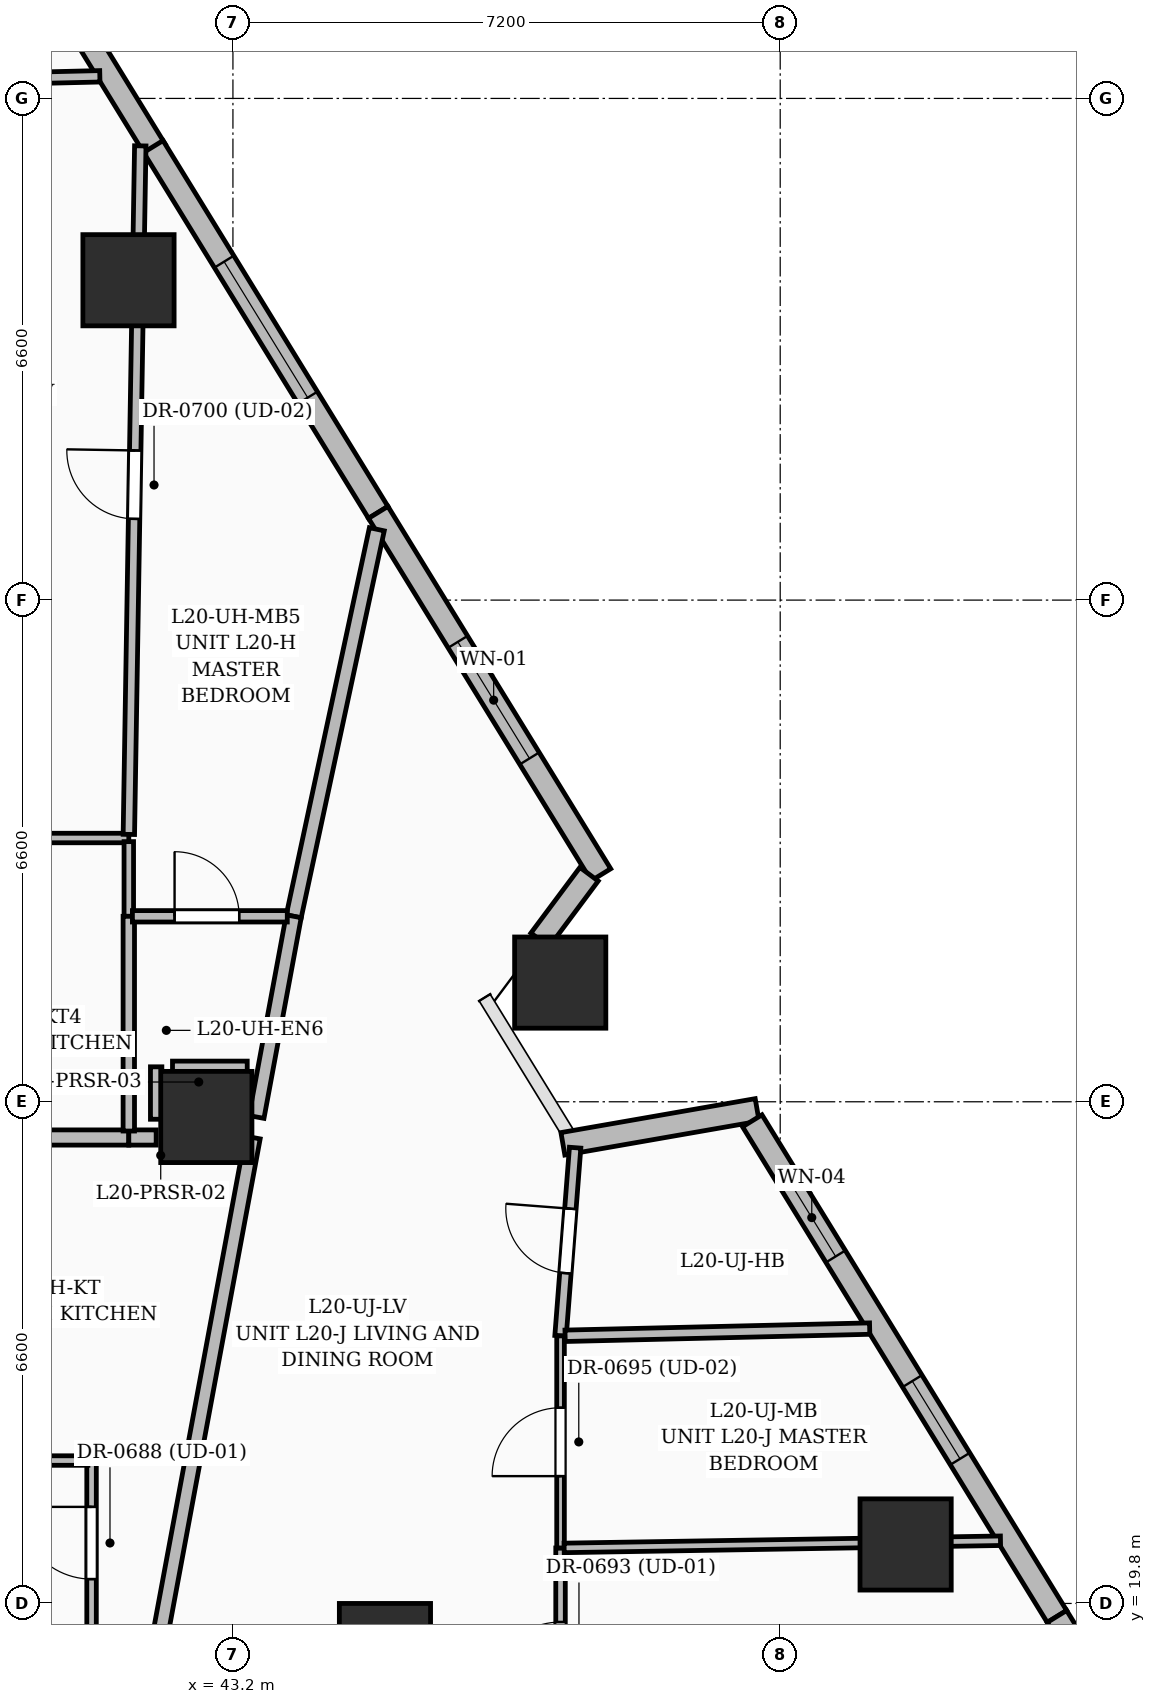
"""IFC4 building model, lengths in metres.
Left out: names, types, materials, properties, quantities, classifications, styles, units other than length and angle.
Written with IfcOpenShell. Run it as: python <this file> out.ifc"""

import sys

from ifc_helpers import new_model, si_unit, direction, frame, frame_2d, origin, origin_2d, place, context, subcontext, project, spatial, rectangle, extrude, element, fill, save


model = new_model("IFC4")
c1 = context("Model", 3, precision=1e-05, world=origin(), true_north=direction((0.0, 1.0)))
c2 = subcontext(c1, "Body", "Model", "MODEL_VIEW")
j1 = project(units=[si_unit("LENGTHUNIT", "METRE"), si_unit("PLANEANGLEUNIT", "RADIAN")], contexts=[c1])
p1 = place(None, origin())
s1 = spatial("IfcSite", under=j1, at=p1, CompositionType="ELEMENT")
p2 = place(p1, origin())
s2 = spatial("IfcBuilding", under=s1, at=p2, CompositionType="ELEMENT")
p3 = place(p2, frame((0.0, 0.0, 82.2)))
s3 = spatial("IfcBuildingStorey", under=s2, at=p3, CompositionType="ELEMENT", Elevation=82.2)
for number, where, z_axis, x_axis in (
    (1, (45.2, 19.2, 0.0), (0.0, 0.0, 1.0), (1.0, 0.0, 0.0)),
    (2, (42.85, 26.2, 0.0), (0.0, 0.0, 1.0), (1.0, 0.0, 0.0)),
    (3, (52.05, 20.576, 0.0), (0.0, 0.0, 1.0), (1.0, 0.0, 0.0)),
    (4, (47.506, 27.968, 0.0), (0.0, 0.0, 1.0), (1.0, 0.0, 0.0)),
    (5, (41.826, 37.208, 0.0), (0.0, 0.0, 1.0), (1.0, 0.0, 0.0)),
):
    element("IfcColumn", number, at=place(p3, frame(where, z_axis=z_axis, x_axis=x_axis)), inside=s3, PredefinedType="COLUMN", context=c2, shape_type="SweptSolid", body=[
        extrude(rectangle(XDim=1.2, YDim=1.2, at=origin_2d()), origin(), (0.0, 0.0, 1.0), 3.6),
    ])
p4 = place(p3, frame((39.54, 43.217, 0.0), z_axis=(0.0, 0.0, 1.0), x_axis=(0.52373802156, -0.851879383935, 0.0)))
e6 = element("IfcWall", 6, at=p4, inside=s3, PredefinedType="SOLIDWALL", context=c2, shape_type="SweptSolid", body=[
    extrude(rectangle(XDim=5.042, YDim=0.3, at=frame_2d((2.521, 0.0))), origin(), (0.0, 0.0, 1.0), 3.35),
])
p5 = place(p4, frame((1.295, 0.0, 0.55)))
e7 = element("IfcOpeningElement", 7, at=p5, cuts=e6, PredefinedType="OPENING", context=c2, shape_type="SweptSolid", body=[
    extrude(rectangle(XDim=2.1, YDim=2.4, at=frame_2d((1.05, 1.2))), frame((0.0, 0.16, 0.0), z_axis=(0.0, -1.0, 0.0), x_axis=(1.0, 0.0, 0.0)), (0.0, 0.0, 1.0), 0.32),
])
p6 = place(p3, frame((42.153, 38.967, 0.0), z_axis=(0.0, 0.0, 1.0), x_axis=(0.523687465278, -0.851910464022, 0.0)))
e8 = element("IfcWall", 8, at=p6, inside=s3, PredefinedType="SOLIDWALL", context=c2, shape_type="SweptSolid", body=[
    extrude(rectangle(XDim=5.649, YDim=0.3, at=frame_2d((2.825, 0.0))), origin(), (0.0, 0.0, 1.0), 3.35),
])
p7 = place(p6, frame((1.778, 0.0, 0.55)))
e9 = element("IfcOpeningElement", 9, at=p7, cuts=e8, PredefinedType="OPENING", context=c2, shape_type="SweptSolid", body=[
    extrude(rectangle(XDim=2.1, YDim=2.4, at=frame_2d((1.05, 1.2))), frame((0.0, 0.16, 0.0), z_axis=(0.0, -1.0, 0.0), x_axis=(1.0, 0.0, 0.0)), (0.0, 0.0, 1.0), 0.32),
])
p8 = place(p3, frame((45.111, 34.154, 0.0), z_axis=(0.0, 0.0, 1.0), x_axis=(0.523710369238, -0.851896384047, 0.0)))
e10 = element("IfcWall", 10, at=p8, inside=s3, PredefinedType="SOLIDWALL", context=c2, shape_type="SweptSolid", body=[
    extrude(rectangle(XDim=5.596, YDim=0.3, at=frame_2d((2.798, 0.0))), origin(), (0.0, 0.0, 1.0), 3.35),
])
p9 = place(p8, frame((2.0, 0.0, 0.6)))
e11 = element("IfcOpeningElement", 11, at=p9, cuts=e10, PredefinedType="OPENING", context=c2, shape_type="SweptSolid", body=[
    extrude(rectangle(XDim=1.8, YDim=2.1, at=frame_2d((0.9, 1.05))), frame((0.0, 0.16, 0.0), z_axis=(0.0, -1.0, 0.0), x_axis=(1.0, 0.0, 0.0)), (0.0, 0.0, 1.0), 0.32),
])
p10 = place(p3, frame((47.885, 29.394, 0.0), z_axis=(0.0, 0.0, 1.0), x_axis=(-0.598186461049, -0.801356947819, 0.0)))
e12 = element("IfcWall", 12, at=p10, inside=s3, PredefinedType="SOLIDWALL", context=c2, shape_type="SweptSolid", body=[
    extrude(rectangle(XDim=1.078, YDim=0.3, at=frame_2d((0.539, 0.0))), origin(), (0.0, 0.0, 1.0), 2.375),
])
p11 = place(p3, frame((47.541, 25.847, 0.0), z_axis=(0.0, 0.0, 1.0), x_axis=(0.985095505459, 0.172008270511, 0.0)))
e13 = element("IfcWall", 13, at=p11, inside=s3, PredefinedType="SOLIDWALL", context=c2, shape_type="SweptSolid", body=[
    extrude(rectangle(XDim=2.594, YDim=0.3, at=frame_2d((1.297, 0.0))), origin(), (0.0, 0.0, 1.0), 2.375),
])
p12 = place(p3, frame((50.032, 26.15, 0.0), z_axis=(0.0, 0.0, 1.0), x_axis=(0.523673810553, -0.851918857721, 0.0)))
e14 = element("IfcWall", 14, at=p12, inside=s3, PredefinedType="SOLIDWALL", context=c2, shape_type="SweptSolid", body=[
    extrude(rectangle(XDim=7.654, YDim=0.3, at=frame_2d((3.827, 0.0))), origin(), (0.0, 0.0, 1.0), 3.35),
])
p13 = place(p12, frame((0.895, 0.0, 0.8)))
e15 = element("IfcOpeningElement", 15, at=p13, cuts=e14, PredefinedType="OPENING", context=c2, shape_type="SweptSolid", body=[
    extrude(rectangle(XDim=1.2, YDim=1.8, at=frame_2d((0.6, 0.9))), frame((0.0, 0.16, 0.0), z_axis=(0.0, -1.0, 0.0), x_axis=(1.0, 0.0, 0.0)), (0.0, 0.0, 1.0), 0.32),
])
p14 = place(p12, frame((4.02, 0.0, 0.8)))
e16 = element("IfcOpeningElement", 16, at=p14, cuts=e14, PredefinedType="OPENING", context=c2, shape_type="SweptSolid", body=[
    extrude(rectangle(XDim=1.2, YDim=1.8, at=frame_2d((0.6, 0.9))), frame((0.0, 0.16, 0.0), z_axis=(0.0, -1.0, 0.0), x_axis=(1.0, 0.0, 0.0)), (0.0, 0.0, 1.0), 0.32),
])
p15 = place(p3, frame((54.041, 19.629, 0.0), z_axis=(0.0, 0.0, 1.0), x_axis=(0.523661280051, -0.851926560083, 0.0)))
e17 = element("IfcWall", 17, at=p15, inside=s3, PredefinedType="SOLIDWALL", context=c2, shape_type="SweptSolid", body=[
    extrude(rectangle(XDim=7.934, YDim=0.3, at=frame_2d((3.967, 0.0))), origin(), (0.0, 0.0, 1.0), 3.35),
])
p16 = place(p15, frame((3.45, 0.0, 0.6)))
e18 = element("IfcOpeningElement", 18, at=p16, cuts=e17, PredefinedType="OPENING", context=c2, shape_type="SweptSolid", body=[
    extrude(rectangle(XDim=2.4, YDim=2.1, at=frame_2d((1.2, 1.05))), frame((0.0, 0.16, 0.0), z_axis=(0.0, -1.0, 0.0), x_axis=(1.0, 0.0, 0.0)), (0.0, 0.0, 1.0), 0.32),
])
p17 = place(p3, frame((41.34, 17.835, 0.0), z_axis=(0.0, 0.0, 1.0), x_axis=(0.0, 1.0, 0.0)))
e19 = element("IfcWall", 19, at=p17, inside=s3, PredefinedType="PARTITIONING", context=c2, shape_type="SweptSolid", body=[
    extrude(rectangle(XDim=3.845, YDim=0.125, at=frame_2d((1.922, 0.0))), origin(), (0.0, 0.0, 1.0), 3.35),
])
p18 = place(p17, frame((2.285, 0.0, 0.0)))
e20 = element("IfcOpeningElement", 20, at=p18, cuts=e19, PredefinedType="OPENING", context=c2, shape_type="SweptSolid", body=[
    extrude(rectangle(XDim=0.95, YDim=2.2, at=frame_2d((0.475, 1.1))), frame((0.0, 0.072, 0.0), z_axis=(0.0, -1.0, 0.0), x_axis=(1.0, 0.0, 0.0)), (0.0, 0.0, 1.0), 0.145),
])
p19 = place(p3, frame((41.292, 21.68, 0.0), z_axis=(0.0, 0.0, 1.0), x_axis=(-1.0, 0.0, 0.0)))
e21 = element("IfcWall", 21, at=p19, inside=s3, PredefinedType="PARTITIONING", context=c2, shape_type="SweptSolid", body=[
    extrude(rectangle(XDim=2.742, YDim=0.125, at=frame_2d((1.371, 0.0))), origin(), (0.0, 0.0, 1.0), 3.35),
])
p20 = place(p3, frame((41.956, 17.833, 0.0), z_axis=(0.0, 0.0, 1.0), x_axis=(0.182682671213, 0.98317192883, 0.0)))
e22 = element("IfcWall", 22, at=p20, inside=s3, PredefinedType="PARTITIONING", context=c2, shape_type="SweptSolid", body=[
    extrude(rectangle(XDim=8.235, YDim=0.2, at=frame_2d((4.118, 0.0))), origin(), (0.0, 0.0, 1.0), 2.309),
])
p21 = place(p3, frame((41.83, 25.93, 0.0), z_axis=(0.0, 0.0, 1.0), x_axis=(-1.0, 0.0, 0.0)))
e23 = element("IfcWall", 23, at=p21, inside=s3, PredefinedType="PARTITIONING", context=c2, shape_type="SweptSolid", body=[
    extrude(rectangle(XDim=3.233, YDim=0.2, at=frame_2d((1.616, 0.0))), origin(), (0.0, 0.0, 1.0), 2.37),
])
p22 = place(p3, frame((42.19, 25.93, 0.0), z_axis=(0.0, 0.0, 1.0), x_axis=(-1.0, 0.0, 0.0)))
e24 = element("IfcWall", 24, at=p22, inside=s3, PredefinedType="PARTITIONING", context=c2, shape_type="SweptSolid", body=[
    extrude(rectangle(XDim=0.36, YDim=0.2, at=frame_2d((0.18, 0.0))), origin(), (0.0, 0.0, 1.0), 2.37),
])
p23 = place(p3, frame((47.51, 23.32, 0.0), z_axis=(0.0, 0.0, 1.0), x_axis=(0.077275386284, 0.997009786649, 0.0)))
e25 = element("IfcWall", 25, at=p23, inside=s3, PredefinedType="PARTITIONING", context=c2, shape_type="SweptSolid", body=[
    extrude(rectangle(XDim=2.483, YDim=0.15, at=frame_2d((1.242, 0.0))), origin(), (0.0, 0.0, 1.0), 3.35),
])
p24 = place(p23, frame((0.828, 0.0, 0.0)))
e26 = element("IfcOpeningElement", 26, at=p24, cuts=e25, PredefinedType="OPENING", context=c2, shape_type="SweptSolid", body=[
    extrude(rectangle(XDim=0.85, YDim=2.1, at=frame_2d((0.425, 1.05))), frame((0.0, 0.085, 0.0), z_axis=(0.0, -1.0, 0.0), x_axis=(1.0, 0.0, 0.0)), (0.0, 0.0, 1.0), 0.17),
])
p25 = place(p3, frame((47.51, 17.835, 0.0), z_axis=(0.0, 0.0, 1.0), x_axis=(0.0, 1.0, 0.0)))
e27 = element("IfcWall", 27, at=p25, inside=s3, PredefinedType="PARTITIONING", context=c2, shape_type="SweptSolid", body=[
    extrude(rectangle(XDim=2.695, YDim=0.125, at=frame_2d((1.348, 0.0))), origin(), (0.0, 0.0, 1.0), 2.709),
])
p26 = place(p25, frame((0.771, 0.0, 0.0)))
e28 = element("IfcOpeningElement", 28, at=p26, cuts=e27, PredefinedType="OPENING", context=c2, shape_type="SweptSolid", body=[
    extrude(rectangle(XDim=0.95, YDim=2.2, at=frame_2d((0.475, 1.1))), frame((0.0, 0.072, 0.0), z_axis=(0.0, -1.0, 0.0), x_axis=(1.0, 0.0, 0.0)), (0.0, 0.0, 1.0), 0.145),
])
p27 = place(p3, frame((47.51, 20.53, 0.0), z_axis=(0.0, 0.0, 1.0), x_axis=(0.0, 1.0, 0.0)))
e29 = element("IfcWall", 29, at=p27, inside=s3, PredefinedType="PARTITIONING", context=c2, shape_type="SweptSolid", body=[
    extrude(rectangle(XDim=2.79, YDim=0.1, at=frame_2d((1.395, 0.0))), origin(), (0.0, 0.0, 1.0), 2.709),
])
p28 = place(p27, frame((0.945, 0.0, 0.0)))
e30 = element("IfcOpeningElement", 30, at=p28, cuts=e29, PredefinedType="OPENING", context=c2, shape_type="SweptSolid", body=[
    extrude(rectangle(XDim=0.9, YDim=2.15, at=frame_2d((0.45, 1.075))), frame((0.0, 0.06, 0.0), z_axis=(0.0, -1.0, 0.0), x_axis=(1.0, 0.0, 0.0)), (0.0, 0.0, 1.0), 0.12),
])
p29 = place(p3, frame((45.093, 33.932, 0.0), z_axis=(0.0, 0.0, 1.0), x_axis=(-0.209881245986, -0.977726885476, 0.0)))
e31 = element("IfcWall", 31, at=p29, inside=s3, PredefinedType="PARTITIONING", context=c2, shape_type="SweptSolid", body=[
    extrude(rectangle(XDim=5.208, YDim=0.2, at=frame_2d((2.604, 0.0))), origin(), (0.0, 0.0, 1.0), 2.37),
])
p30 = place(p3, frame((44.0, 28.84, 0.0), z_axis=(0.0, 0.0, 1.0), x_axis=(-0.18247668152, -0.983210181345, 0.0)))
e32 = element("IfcWall", 32, at=p30, inside=s3, PredefinedType="PARTITIONING", context=c2, shape_type="SweptSolid", body=[
    extrude(rectangle(XDim=2.685, YDim=0.2, at=frame_2d((1.343, 0.0))), origin(), (0.0, 0.0, 1.0), 2.709),
])
p31 = place(p3, frame((47.57, 23.321, 0.0), z_axis=(0.0, 0.0, 1.0), x_axis=(0.999720663017, 0.023634634246, 0.0)))
e33 = element("IfcWall", 33, at=p31, inside=s3, PredefinedType="PARTITIONING", context=c2, shape_type="SweptSolid", body=[
    extrude(rectangle(XDim=4.008, YDim=0.15, at=frame_2d((2.004, 0.0))), origin(), (0.0, 0.0, 1.0), 2.37),
])
p32 = place(p3, frame((53.298, 20.625, 0.0), z_axis=(0.0, 0.0, 1.0), x_axis=(-0.9998645785, -0.016456751239, 0.0)))
e34 = element("IfcWall", 34, at=p32, inside=s3, PredefinedType="PARTITIONING", context=c2, shape_type="SweptSolid", body=[
    extrude(rectangle(XDim=5.741, YDim=0.125, at=frame_2d((2.871, 0.0))), origin(), (0.0, 0.0, 1.0), 2.709),
])
p33 = place(p3, frame((41.449, 39.891, 0.0), z_axis=(0.0, 0.0, 1.0), x_axis=(-0.999721247685, -0.02360989047, 0.0)))
e35 = element("IfcWall", 35, at=p33, inside=s3, PredefinedType="PARTITIONING", context=c2, shape_type="SweptSolid", body=[
    extrude(rectangle(XDim=3.795, YDim=0.15, at=frame_2d((1.897, 0.0))), origin(), (0.0, 0.0, 1.0), 3.35),
])
p34 = place(p33, frame((1.506, 0.0, 0.0)))
e36 = element("IfcOpeningElement", 36, at=p34, cuts=e35, PredefinedType="OPENING", context=c2, shape_type="SweptSolid", body=[
    extrude(rectangle(XDim=0.85, YDim=2.1, at=frame_2d((0.425, 1.05))), frame((0.0, 0.085, 0.0), z_axis=(0.0, -1.0, 0.0), x_axis=(1.0, 0.0, 0.0)), (0.0, 0.0, 1.0), 0.17),
])
p35 = place(p3, frame((37.655, 29.87, 0.0), z_axis=(0.0, 0.0, 1.0), x_axis=(1.0, 0.0, 0.0)))
e37 = element("IfcWall", 37, at=p35, inside=s3, PredefinedType="PARTITIONING", context=c2, shape_type="SweptSolid", body=[
    extrude(rectangle(XDim=4.175, YDim=0.125, at=frame_2d((2.087, 0.0))), origin(), (0.0, 0.0, 1.0), 3.35),
])
p36 = place(p35, frame((1.57, 0.0, 0.0)))
e38 = element("IfcOpeningElement", 38, at=p36, cuts=e37, PredefinedType="OPENING", context=c2, shape_type="SweptSolid", body=[
    extrude(rectangle(XDim=0.95, YDim=2.2, at=frame_2d((0.475, 1.1))), frame((0.0, 0.072, 0.0), z_axis=(0.0, -1.0, 0.0), x_axis=(1.0, 0.0, 0.0)), (0.0, 0.0, 1.0), 0.145),
])
p37 = place(p3, frame((41.831, 29.917, 0.0), z_axis=(0.0, 0.0, 1.0), x_axis=(0.016599696118, 0.999862215552, 0.0)))
e39 = element("IfcWall", 39, at=p37, inside=s3, PredefinedType="PARTITIONING", context=c2, shape_type="SweptSolid", body=[
    extrude(rectangle(XDim=9.06, YDim=0.15, at=frame_2d((4.53, 0.0))), origin(), (0.0, 0.0, 1.0), 2.345),
])
p38 = place(p37, frame((4.152, 0.0, 0.0)))
e40 = element("IfcOpeningElement", 40, at=p38, cuts=e39, PredefinedType="OPENING", context=c2, shape_type="SweptSolid", body=[
    extrude(rectangle(XDim=0.9, YDim=2.15, at=frame_2d((0.45, 1.075))), frame((0.0, 0.085, 0.0), z_axis=(0.0, -1.0, 0.0), x_axis=(1.0, 0.0, 0.0)), (0.0, 0.0, 1.0), 0.17),
])
p39 = place(p3, frame((41.83, 28.84, 0.0), z_axis=(0.0, 0.0, 1.0), x_axis=(0.0, 1.0, 0.0)))
e41 = element("IfcWall", 41, at=p39, inside=s3, PredefinedType="PARTITIONING", context=c2, shape_type="SweptSolid", body=[
    extrude(rectangle(XDim=0.982, YDim=0.125, at=frame_2d((0.491, 0.0))), origin(), (0.0, 0.0, 1.0), 2.709),
])
p40 = place(p3, frame((41.83, 26.015, 0.0), z_axis=(0.0, 0.0, 1.0), x_axis=(0.0, 1.0, 0.0)))
e42 = element("IfcWall", 42, at=p40, inside=s3, PredefinedType="PARTITIONING", context=c2, shape_type="SweptSolid", body=[
    extrude(rectangle(XDim=2.825, YDim=0.15, at=frame_2d((1.413, 0.0))), origin(), (0.0, 0.0, 1.0), 2.37),
])
p41 = place(p3, frame((41.877, 28.84, 0.0), z_axis=(0.0, 0.0, 1.0), x_axis=(1.0, 0.0, 0.0)))
e43 = element("IfcWall", 43, at=p41, inside=s3, PredefinedType="PARTITIONING", context=c2, shape_type="SweptSolid", body=[
    extrude(rectangle(XDim=2.038, YDim=0.15, at=frame_2d((1.019, 0.0))), origin(), (0.0, 0.0, 1.0), 2.345),
])
p42 = place(p41, frame((0.555, 0.0, 0.0)))
e44 = element("IfcOpeningElement", 44, at=p42, cuts=e43, PredefinedType="OPENING", context=c2, shape_type="SweptSolid", body=[
    extrude(rectangle(XDim=0.85, YDim=2.1, at=frame_2d((0.425, 1.05))), frame((0.0, 0.085, 0.0), z_axis=(0.0, -1.0, 0.0), x_axis=(1.0, 0.0, 0.0)), (0.0, 0.0, 1.0), 0.17),
])
p43 = place(p3, frame((42.19, 26.17, 0.0), z_axis=(0.0, 0.0, 1.0), x_axis=(0.0, 1.0, 0.0)))
e45 = element("IfcWall", 45, at=p43, inside=s3, PredefinedType="PARTITIONING", context=c2, shape_type="SweptSolid", body=[
    extrude(rectangle(XDim=0.69, YDim=0.15, at=frame_2d((0.345, 0.0))), origin(), (0.0, 0.0, 1.0), 2.37),
])
p44 = place(p3, frame((42.405, 26.86, 0.0), z_axis=(0.0, 0.0, 1.0), x_axis=(1.0, 0.0, 0.0)))
e46 = element("IfcWall", 46, at=p44, inside=s3, PredefinedType="PARTITIONING", context=c2, shape_type="SweptSolid", body=[
    extrude(rectangle(XDim=0.983, YDim=0.15, at=frame_2d((0.491, 0.0))), origin(), (0.0, 0.0, 1.0), 2.345),
])
p45 = place(p7, origin())
e47 = element("IfcWindow", 47, at=p45, inside=s3, PartitioningType="SINGLE_PANEL", PredefinedType="WINDOW", context=c2, shape_type="SweptSolid", body=[
    extrude(rectangle(XDim=2.1, YDim=2.4, at=frame_2d((1.05, 1.2))), frame((0.0, 0.03, 0.0), z_axis=(0.0, -1.0, 0.0), x_axis=(1.0, 0.0, 0.0)), (0.0, 0.0, 1.0), 0.06),
])
fill(e9, e47)
p46 = place(p9, origin())
e48 = element("IfcWindow", 48, at=p46, inside=s3, PartitioningType="SINGLE_PANEL", PredefinedType="WINDOW", context=c2, shape_type="SweptSolid", body=[
    extrude(rectangle(XDim=1.8, YDim=2.1, at=frame_2d((0.9, 1.05))), frame((0.0, 0.03, 0.0), z_axis=(0.0, -1.0, 0.0), x_axis=(1.0, 0.0, 0.0)), (0.0, 0.0, 1.0), 0.06),
])
fill(e11, e48)
p47 = place(p13, origin())
e49 = element("IfcWindow", 49, at=p47, inside=s3, PartitioningType="SINGLE_PANEL", PredefinedType="WINDOW", context=c2, shape_type="SweptSolid", body=[
    extrude(rectangle(XDim=1.2, YDim=1.8, at=frame_2d((0.6, 0.9))), frame((0.0, 0.03, 0.0), z_axis=(0.0, -1.0, 0.0), x_axis=(1.0, 0.0, 0.0)), (0.0, 0.0, 1.0), 0.06),
])
fill(e15, e49)
p48 = place(p14, origin())
e50 = element("IfcWindow", 50, at=p48, inside=s3, PartitioningType="SINGLE_PANEL", PredefinedType="WINDOW", context=c2, shape_type="SweptSolid", body=[
    extrude(rectangle(XDim=1.2, YDim=1.8, at=frame_2d((0.6, 0.9))), frame((0.0, 0.03, 0.0), z_axis=(0.0, -1.0, 0.0), x_axis=(1.0, 0.0, 0.0)), (0.0, 0.0, 1.0), 0.06),
])
fill(e16, e50)
p49 = place(p18, origin())
e51 = element("IfcDoor", 51, at=p49, inside=s3, OperationType="SINGLE_SWING_RIGHT", PredefinedType="DOOR", context=c2, shape_type="SweptSolid", body=[
    extrude(rectangle(XDim=0.95, YDim=2.2, at=frame_2d((0.475, 1.1))), frame((0.0, 0.025, 0.0), z_axis=(0.0, -1.0, 0.0), x_axis=(1.0, 0.0, 0.0)), (0.0, 0.0, 1.0), 0.05),
])
fill(e20, e51)
p50 = place(p26, origin())
e52 = element("IfcDoor", 52, at=p50, inside=s3, OperationType="SINGLE_SWING_LEFT", PredefinedType="DOOR", context=c2, shape_type="SweptSolid", body=[
    extrude(rectangle(XDim=0.95, YDim=2.2, at=frame_2d((0.475, 1.1))), frame((0.0, 0.025, 0.0), z_axis=(0.0, -1.0, 0.0), x_axis=(1.0, 0.0, 0.0)), (0.0, 0.0, 1.0), 0.05),
])
fill(e28, e52)
p51 = place(p24, origin())
e53 = element("IfcDoor", 53, at=p51, inside=s3, OperationType="SINGLE_SWING_RIGHT", PredefinedType="DOOR", context=c2, shape_type="SweptSolid", body=[
    extrude(rectangle(XDim=0.85, YDim=2.1, at=frame_2d((0.425, 1.05))), frame((0.0, 0.025, 0.0), z_axis=(0.0, -1.0, 0.0), x_axis=(1.0, 0.0, 0.0)), (0.0, 0.0, 1.0), 0.05),
])
fill(e26, e53)
p52 = place(p28, origin())
e54 = element("IfcDoor", 54, at=p52, inside=s3, OperationType="SINGLE_SWING_LEFT", PredefinedType="DOOR", context=c2, shape_type="SweptSolid", body=[
    extrude(rectangle(XDim=0.9, YDim=2.15, at=frame_2d((0.45, 1.075))), frame((0.0, 0.025, 0.0), z_axis=(0.0, -1.0, 0.0), x_axis=(1.0, 0.0, 0.0)), (0.0, 0.0, 1.0), 0.05),
])
fill(e30, e54)
p53 = place(p38, origin())
e55 = element("IfcDoor", 55, at=p53, inside=s3, OperationType="SINGLE_SWING_RIGHT", PredefinedType="DOOR", context=c2, shape_type="SweptSolid", body=[
    extrude(rectangle(XDim=0.9, YDim=2.15, at=frame_2d((0.45, 1.075))), frame((0.0, 0.025, 0.0), z_axis=(0.0, -1.0, 0.0), x_axis=(1.0, 0.0, 0.0)), (0.0, 0.0, 1.0), 0.05),
])
fill(e40, e55)
p54 = place(p42, origin())
e56 = element("IfcDoor", 56, at=p54, inside=s3, OperationType="SINGLE_SWING_LEFT", PredefinedType="DOOR", context=c2, shape_type="SweptSolid", body=[
    extrude(rectangle(XDim=0.85, YDim=2.1, at=frame_2d((0.425, 1.05))), frame((0.0, 0.025, 0.0), z_axis=(0.0, -1.0, 0.0), x_axis=(1.0, 0.0, 0.0)), (0.0, 0.0, 1.0), 0.05),
])
fill(e44, e56)
save(model, sys.argv[1])
